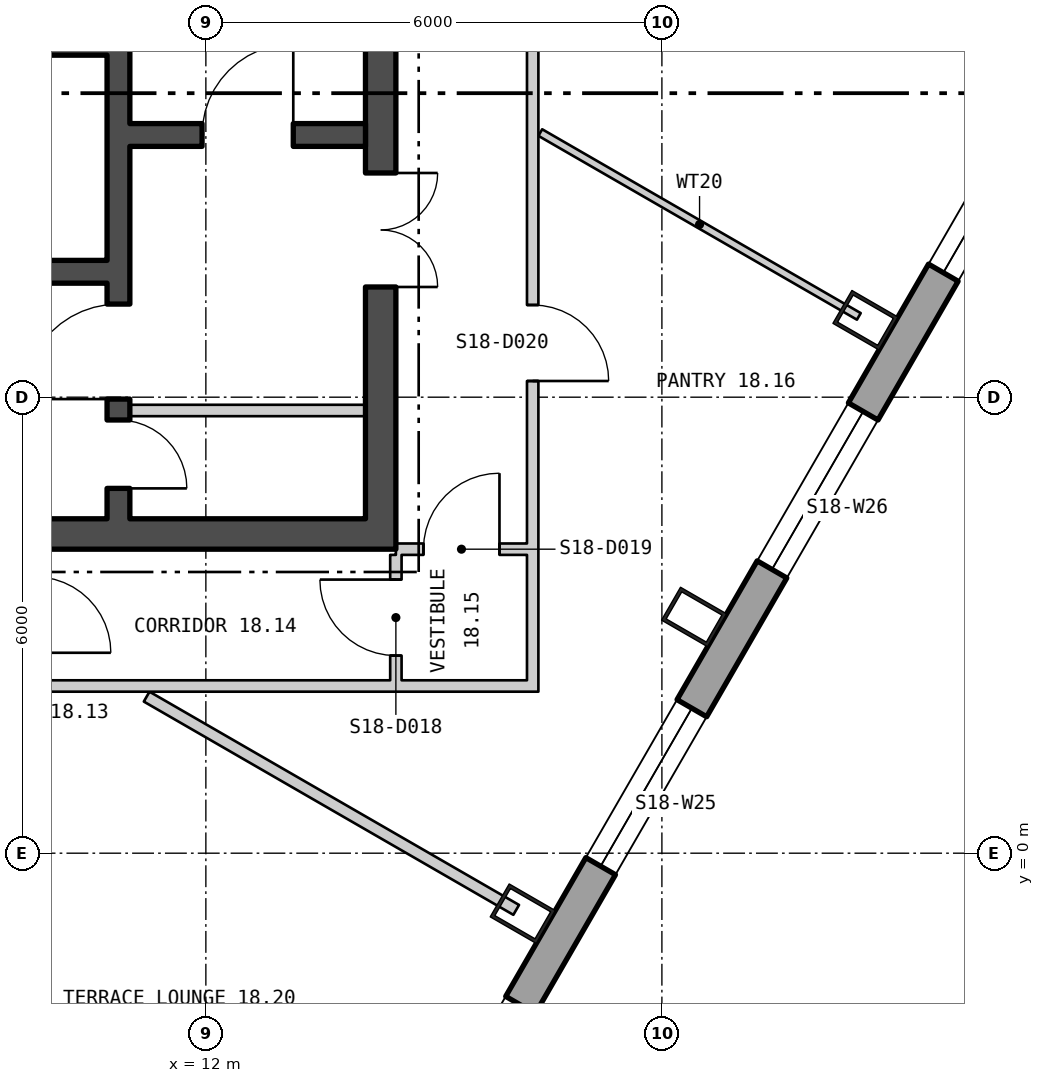
"""IFC4 building model, lengths in metres.
Left out: names, types, materials, properties, quantities, classifications, styles, units other than length and angle.
Written with IfcOpenShell. Run it as: python <this file> out.ifc"""

import sys

from ifc_helpers import new_model, si_unit, direction, frame, frame_2d, origin, origin_2d, place, context, subcontext, project, spatial, polyline, rectangle, hollow_rectangle, outline, extrude, element, fill, save


model = new_model("IFC4")
c1 = context("Model", 3, precision=1e-05, world=origin(), true_north=direction((0.0, 1.0)))
c2 = subcontext(c1, "Body", "Model", "MODEL_VIEW")
j1 = project(units=[si_unit("LENGTHUNIT", "METRE"), si_unit("PLANEANGLEUNIT", "RADIAN")], contexts=[c1])
p1 = place(None, origin())
s1 = spatial("IfcSite", under=j1, at=p1, CompositionType="ELEMENT")
p2 = place(p1, origin())
s2 = spatial("IfcBuilding", under=s1, at=p2, CompositionType="ELEMENT")
p3 = place(p2, frame((0.0, 0.0, 245.4)))
s3 = spatial("IfcBuildingStorey", under=s2, at=p3, CompositionType="ELEMENT", Elevation=245.4)
for number, where, z_axis, x_axis in (
    (1, (16.169, -0.796, 0.0), (0.0, 0.0, 1.0), (0.5, 0.866, 0.0)),
    (2, (18.423, 3.108, 0.0), (0.0, 0.0, 1.0), (0.5, 0.866, 0.0)),
    (3, (20.678, 7.013, 0.0), (0.0, 0.0, 1.0), (0.5, 0.866, 0.0)),
):
    element("IfcColumn", number, at=place(p3, frame(where, z_axis=z_axis, x_axis=x_axis)), inside=s3, PredefinedType="COLUMN", context=c2, shape_type="SweptSolid", body=[
        extrude(hollow_rectangle(XDim=0.5, YDim=0.7, WallThickness=0.045, at=origin_2d()), origin(), (0.0, 0.0, 1.0), 3.9),
    ])
p4 = place(p3, frame((2.975, -24.799, -0.18), z_axis=(0.0, 0.0, 1.0), x_axis=(0.500000335318, 0.866025210188, 0.0)))
e4 = element("IfcWall", 4, at=p4, inside=s3, PredefinedType="SOLIDWALL", context=c2, shape_type="SweptSolid", body=[
    extrude(outline(polyline([(-0.13, -0.225), (45.88, -0.225), (45.62, 0.225), (0.13, 0.225), (-0.13, -0.225)])), origin(), (0.0, 0.0, 1.0), 3.68),
])
p5 = place(p4, frame((1.425, 0.0, 1.08)))
e5 = element("IfcOpeningElement", 5, at=p5, cuts=e4, PredefinedType="OPENING", context=c2, shape_type="SweptSolid", body=[
    extrude(rectangle(XDim=2.4, YDim=2.0, at=frame_2d((1.2, 1.0))), frame((0.0, 0.235, 0.0), z_axis=(0.0, -1.0, 0.0), x_axis=(1.0, 0.0, 0.0)), (0.0, 0.0, 1.0), 0.47),
])
p6 = place(p4, frame((5.895, 0.0, 1.08)))
e6 = element("IfcOpeningElement", 6, at=p6, cuts=e4, PredefinedType="OPENING", context=c2, shape_type="SweptSolid", body=[
    extrude(rectangle(XDim=2.4, YDim=2.0, at=frame_2d((1.2, 1.0))), frame((0.0, 0.235, 0.0), z_axis=(0.0, -1.0, 0.0), x_axis=(1.0, 0.0, 0.0)), (0.0, 0.0, 1.0), 0.47),
])
p7 = place(p4, frame((10.403, 0.0, 1.08)))
e7 = element("IfcOpeningElement", 7, at=p7, cuts=e4, PredefinedType="OPENING", context=c2, shape_type="SweptSolid", body=[
    extrude(rectangle(XDim=2.4, YDim=2.0, at=frame_2d((1.2, 1.0))), frame((0.0, 0.235, 0.0), z_axis=(0.0, -1.0, 0.0), x_axis=(1.0, 0.0, 0.0)), (0.0, 0.0, 1.0), 0.47),
])
p8 = place(p4, frame((14.912, 0.0, 1.08)))
e8 = element("IfcOpeningElement", 8, at=p8, cuts=e4, PredefinedType="OPENING", context=c2, shape_type="SweptSolid", body=[
    extrude(rectangle(XDim=2.4, YDim=2.0, at=frame_2d((1.2, 1.0))), frame((0.0, 0.235, 0.0), z_axis=(0.0, -1.0, 0.0), x_axis=(1.0, 0.0, 0.0)), (0.0, 0.0, 1.0), 0.47),
])
p9 = place(p4, frame((19.421, 0.0, 1.08)))
e9 = element("IfcOpeningElement", 9, at=p9, cuts=e4, PredefinedType="OPENING", context=c2, shape_type="SweptSolid", body=[
    extrude(rectangle(XDim=2.4, YDim=2.0, at=frame_2d((1.2, 1.0))), frame((0.0, 0.235, 0.0), z_axis=(0.0, -1.0, 0.0), x_axis=(1.0, 0.0, 0.0)), (0.0, 0.0, 1.0), 0.47),
])
p10 = place(p4, frame((23.929, 0.0, 1.08)))
e10 = element("IfcOpeningElement", 10, at=p10, cuts=e4, PredefinedType="OPENING", context=c2, shape_type="SweptSolid", body=[
    extrude(rectangle(XDim=2.4, YDim=2.0, at=frame_2d((1.2, 1.0))), frame((0.0, 0.235, 0.0), z_axis=(0.0, -1.0, 0.0), x_axis=(1.0, 0.0, 0.0)), (0.0, 0.0, 1.0), 0.47),
])
p11 = place(p4, frame((28.438, 0.0, 1.08)))
e11 = element("IfcOpeningElement", 11, at=p11, cuts=e4, PredefinedType="OPENING", context=c2, shape_type="SweptSolid", body=[
    extrude(rectangle(XDim=2.4, YDim=2.0, at=frame_2d((1.2, 1.0))), frame((0.0, 0.235, 0.0), z_axis=(0.0, -1.0, 0.0), x_axis=(1.0, 0.0, 0.0)), (0.0, 0.0, 1.0), 0.47),
])
p12 = place(p4, frame((32.947, 0.0, 1.08)))
e12 = element("IfcOpeningElement", 12, at=p12, cuts=e4, PredefinedType="OPENING", context=c2, shape_type="SweptSolid", body=[
    extrude(rectangle(XDim=2.4, YDim=2.0, at=frame_2d((1.2, 1.0))), frame((0.0, 0.235, 0.0), z_axis=(0.0, -1.0, 0.0), x_axis=(1.0, 0.0, 0.0)), (0.0, 0.0, 1.0), 0.47),
])
p13 = place(p4, frame((37.455, 0.0, 1.08)))
e13 = element("IfcOpeningElement", 13, at=p13, cuts=e4, PredefinedType="OPENING", context=c2, shape_type="SweptSolid", body=[
    extrude(rectangle(XDim=2.4, YDim=2.0, at=frame_2d((1.2, 1.0))), frame((0.0, 0.235, 0.0), z_axis=(0.0, -1.0, 0.0), x_axis=(1.0, 0.0, 0.0)), (0.0, 0.0, 1.0), 0.47),
])
p14 = place(p4, frame((41.925, 0.0, 1.08)))
e14 = element("IfcOpeningElement", 14, at=p14, cuts=e4, PredefinedType="OPENING", context=c2, shape_type="SweptSolid", body=[
    extrude(rectangle(XDim=2.4, YDim=2.0, at=frame_2d((1.2, 1.0))), frame((0.0, 0.235, 0.0), z_axis=(0.0, -1.0, 0.0), x_axis=(1.0, 0.0, 0.0)), (0.0, 0.0, 1.0), 0.47),
])
p15 = place(p3, frame((-14.5, 4.2, 0.0), z_axis=(0.0, 0.0, 1.0), x_axis=(1.0, 0.0, 0.0)))
e15 = element("IfcWall", 15, at=p15, inside=s3, PredefinedType="SHEAR", context=c2, shape_type="SweptSolid", body=[
    extrude(rectangle(XDim=29.0, YDim=0.4, at=frame_2d((14.5, 0.0))), origin(), (0.0, 0.0, 1.0), 3.7),
])
p16 = place(p15, frame((9.0, 0.0, 0.0)))
e16 = element("IfcOpeningElement", 16, at=p16, cuts=e15, PredefinedType="OPENING", context=c2, shape_type="SweptSolid", body=[
    extrude(rectangle(XDim=1.8, YDim=2.4, at=frame_2d((0.9, 1.2))), frame((0.0, 0.21, 0.0), z_axis=(0.0, -1.0, 0.0), x_axis=(1.0, 0.0, 0.0)), (0.0, 0.0, 1.0), 0.42),
])
p17 = place(p15, frame((19.0, 0.0, 0.0)))
e17 = element("IfcOpeningElement", 17, at=p17, cuts=e15, PredefinedType="OPENING", context=c2, shape_type="SweptSolid", body=[
    extrude(rectangle(XDim=1.8, YDim=2.4, at=frame_2d((0.9, 1.2))), frame((0.0, 0.21, 0.0), z_axis=(0.0, -1.0, 0.0), x_axis=(1.0, 0.0, 0.0)), (0.0, 0.0, 1.0), 0.42),
])
p18 = place(p3, frame((14.3, 4.4, 0.0), z_axis=(0.0, 0.0, 1.0), x_axis=(0.0, 1.0, 0.0)))
e18 = element("IfcWall", 18, at=p18, inside=s3, PredefinedType="SHEAR", context=c2, shape_type="SweptSolid", body=[
    extrude(rectangle(XDim=13.2, YDim=0.4, at=frame_2d((6.6, 0.0))), origin(), (0.0, 0.0, 1.0), 3.7),
])
p19 = place(p18, frame((3.05, 0.0, 0.0)))
e19 = element("IfcOpeningElement", 19, at=p19, cuts=e18, PredefinedType="OPENING", context=c2, shape_type="SweptSolid", body=[
    extrude(rectangle(XDim=1.5, YDim=2.1, at=frame_2d((0.75, 1.05))), frame((0.0, 0.21, 0.0), z_axis=(0.0, -1.0, 0.0), x_axis=(1.0, 0.0, 0.0)), (0.0, 0.0, 1.0), 0.42),
])
p20 = place(p3, frame((10.85, 4.4, 0.0), z_axis=(0.0, 0.0, 1.0), x_axis=(0.0, 1.0, 0.0)))
e20 = element("IfcWall", 20, at=p20, inside=s3, PredefinedType="SHEAR", context=c2, shape_type="SweptSolid", body=[
    extrude(rectangle(XDim=13.2, YDim=0.3, at=frame_2d((6.6, 0.0))), origin(), (0.0, 0.0, 1.0), 3.7),
])
p21 = place(p20, frame((1.575, 0.0, 0.0)))
e21 = element("IfcOpeningElement", 21, at=p21, cuts=e20, PredefinedType="OPENING", context=c2, shape_type="SweptSolid", body=[
    extrude(rectangle(XDim=1.25, YDim=2.1, at=frame_2d((0.625, 1.05))), frame((0.0, 0.16, 0.0), z_axis=(0.0, -1.0, 0.0), x_axis=(1.0, 0.0, 0.0)), (0.0, 0.0, 1.0), 0.32),
])
p22 = place(p20, frame((0.4, 0.0, 0.0)))
e22 = element("IfcOpeningElement", 22, at=p22, cuts=e20, PredefinedType="OPENING", context=c2, shape_type="SweptSolid", body=[
    extrude(rectangle(XDim=0.9, YDim=2.1, at=frame_2d((0.45, 1.05))), frame((0.0, 0.16, 0.0), z_axis=(0.0, -1.0, 0.0), x_axis=(1.0, 0.0, 0.0)), (0.0, 0.0, 1.0), 0.32),
])
p23 = place(p3, frame((11.0, 9.45, 0.0), z_axis=(0.0, 0.0, 1.0), x_axis=(1.0, 0.0, 0.0)))
e23 = element("IfcWall", 23, at=p23, inside=s3, PredefinedType="SHEAR", context=c2, shape_type="SweptSolid", body=[
    extrude(rectangle(XDim=3.1, YDim=0.3, at=frame_2d((1.55, 0.0))), origin(), (0.0, 0.0, 1.0), 3.7),
])
p24 = place(p23, frame((0.95, 0.0, 0.0)))
e24 = element("IfcOpeningElement", 24, at=p24, cuts=e23, PredefinedType="OPENING", context=c2, shape_type="SweptSolid", body=[
    extrude(rectangle(XDim=1.2, YDim=2.1, at=frame_2d((0.6, 1.05))), frame((0.0, 0.16, 0.0), z_axis=(0.0, -1.0, 0.0), x_axis=(1.0, 0.0, 0.0)), (0.0, 0.0, 1.0), 0.32),
])
p25 = place(p3, frame((2.6, 10.65, 0.0), z_axis=(0.0, 0.0, 1.0), x_axis=(1.0, 0.0, 0.0)))
e25 = element("IfcWall", 25, at=p25, inside=s3, PredefinedType="SHEAR", context=c2, shape_type="SweptSolid", body=[
    extrude(rectangle(XDim=8.1, YDim=0.3, at=frame_2d((4.05, 0.0))), origin(), (0.0, 0.0, 1.0), 3.7),
])
p26 = place(p25, frame((3.65, 0.0, 0.0)))
e26 = element("IfcOpeningElement", 26, at=p26, cuts=e25, PredefinedType="OPENING", context=c2, shape_type="SweptSolid", body=[
    extrude(rectangle(XDim=1.0, YDim=2.1, at=frame_2d((0.5, 1.05))), frame((0.0, 0.16, 0.0), z_axis=(0.0, -1.0, 0.0), x_axis=(1.0, 0.0, 0.0)), (0.0, 0.0, 1.0), 0.32),
])
p27 = place(p3, frame((2.6, 7.65, 0.0), z_axis=(0.0, 0.0, 1.0), x_axis=(1.0, 0.0, 0.0)))
e27 = element("IfcWall", 27, at=p27, inside=s3, PredefinedType="SHEAR", context=c2, shape_type="SweptSolid", body=[
    extrude(rectangle(XDim=8.1, YDim=0.3, at=frame_2d((4.05, 0.0))), origin(), (0.0, 0.0, 1.0), 3.7),
])
p28 = place(p3, frame((11.0, 5.825, 0.0), z_axis=(0.0, 0.0, 1.0), x_axis=(1.0, 0.0, 0.0)))
e28 = element("IfcWall", 28, at=p28, inside=s3, PredefinedType="PARTITIONING", context=c2, shape_type="SweptSolid", body=[
    extrude(rectangle(XDim=3.1, YDim=0.15, at=frame_2d((1.55, 0.0))), origin(), (0.0, 0.0, 1.0), 3.7),
])
p29 = place(p3, frame((8.025, 2.2, 0.0), z_axis=(0.0, 0.0, 1.0), x_axis=(1.0, 0.0, 0.0)))
e29 = element("IfcWall", 29, at=p29, inside=s3, PredefinedType="PARTITIONING", context=c2, shape_type="SweptSolid", body=[
    extrude(rectangle(XDim=8.2, YDim=0.15, at=frame_2d((4.1, 0.0))), origin(), (0.0, 0.0, 1.0), 3.7),
])
p30 = place(p3, frame((11.221, 2.06, 0.0), z_axis=(0.0, 0.0, 1.0), x_axis=(0.866108468144, -0.499856100702, 0.0)))
e30 = element("IfcWall", 30, at=p30, inside=s3, PredefinedType="PARTITIONING", context=c2, shape_type="SweptSolid", body=[
    extrude(rectangle(XDim=5.614, YDim=0.15, at=frame_2d((2.807, 0.0))), origin(), (0.0, 0.0, 1.0), 3.7),
])
p31 = place(p3, frame((14.5, 2.275, 0.0), z_axis=(0.0, 0.0, 1.0), x_axis=(0.0, 1.0, 0.0)))
e31 = element("IfcWall", 31, at=p31, inside=s3, PredefinedType="PARTITIONING", context=c2, shape_type="SweptSolid", body=[
    extrude(rectangle(XDim=1.65, YDim=0.15, at=frame_2d((0.825, 0.0))), origin(), (0.0, 0.0, 1.0), 3.7),
])
p32 = place(p31, frame((0.325, 0.0, 0.0)))
e32 = element("IfcOpeningElement", 32, at=p32, cuts=e31, PredefinedType="OPENING", context=c2, shape_type="SweptSolid", body=[
    extrude(rectangle(XDim=1.0, YDim=2.1, at=frame_2d((0.5, 1.05))), frame((0.0, 0.085, 0.0), z_axis=(0.0, -1.0, 0.0), x_axis=(1.0, 0.0, 0.0)), (0.0, 0.0, 1.0), 0.17),
])
p33 = place(p3, frame((14.5, 4.0, 0.0), z_axis=(0.0, 0.0, 1.0), x_axis=(1.0, 0.0, 0.0)))
e33 = element("IfcWall", 33, at=p33, inside=s3, PredefinedType="PARTITIONING", context=c2, shape_type="SweptSolid", body=[
    extrude(rectangle(XDim=1.725, YDim=0.15, at=frame_2d((0.863, 0.0))), origin(), (0.0, 0.0, 1.0), 3.16),
])
p34 = place(p33, frame((0.363, 0.0, 0.0)))
e34 = element("IfcOpeningElement", 34, at=p34, cuts=e33, PredefinedType="OPENING", context=c2, shape_type="SweptSolid", body=[
    extrude(rectangle(XDim=1.0, YDim=2.1, at=frame_2d((0.5, 1.05))), frame((0.0, 0.085, 0.0), z_axis=(0.0, -1.0, 0.0), x_axis=(1.0, 0.0, 0.0)), (0.0, 0.0, 1.0), 0.17),
])
p35 = place(p3, frame((16.3, 2.125, 0.0), z_axis=(0.0, 0.0, 1.0), x_axis=(0.0, 1.0, 0.0)))
e35 = element("IfcWall", 35, at=p35, inside=s3, PredefinedType="PARTITIONING", context=c2, shape_type="SweptSolid", body=[
    extrude(rectangle(XDim=17.622, YDim=0.15, at=frame_2d((8.811, 0.0))), origin(), (0.0, 0.0, 1.0), 3.7),
])
p36 = place(p35, frame((4.088, 0.0, 0.0)))
e36 = element("IfcOpeningElement", 36, at=p36, cuts=e35, PredefinedType="OPENING", context=c2, shape_type="SweptSolid", body=[
    extrude(rectangle(XDim=1.0, YDim=2.1, at=frame_2d((0.5, 1.05))), frame((0.0, 0.085, 0.0), z_axis=(0.0, -1.0, 0.0), x_axis=(1.0, 0.0, 0.0)), (0.0, 0.0, 1.0), 0.17),
])
p37 = place(p35, frame((8.517, 0.0, 0.0)))
e37 = element("IfcOpeningElement", 37, at=p37, cuts=e35, PredefinedType="OPENING", context=c2, shape_type="SweptSolid", body=[
    extrude(rectangle(XDim=1.0, YDim=2.1, at=frame_2d((0.5, 1.05))), frame((0.0, 0.085, 0.0), z_axis=(0.0, -1.0, 0.0), x_axis=(1.0, 0.0, 0.0)), (0.0, 0.0, 1.0), 0.17),
])
p38 = place(p35, frame((13.496, 0.0, 0.0)))
e38 = element("IfcOpeningElement", 38, at=p38, cuts=e35, PredefinedType="OPENING", context=c2, shape_type="SweptSolid", body=[
    extrude(rectangle(XDim=1.0, YDim=2.1, at=frame_2d((0.5, 1.05))), frame((0.0, 0.085, 0.0), z_axis=(0.0, -1.0, 0.0), x_axis=(1.0, 0.0, 0.0)), (0.0, 0.0, 1.0), 0.17),
])
p39 = place(p3, frame((16.4, 9.482, 0.0), z_axis=(0.0, 0.0, 1.0), x_axis=(0.866085797004, -0.499895381282, 0.0)))
e39 = element("IfcWall", 39, at=p39, inside=s3, PredefinedType="PARTITIONING", context=c2, shape_type="SweptSolid", body=[
    extrude(rectangle(XDim=4.839, YDim=0.1, at=frame_2d((2.42, 0.0))), origin(), (0.0, 0.0, 1.0), 3.7),
])
p40 = place(p10, origin())
e40 = element("IfcWindow", 40, at=p40, inside=s3, PartitioningType="SINGLE_PANEL", PredefinedType="WINDOW", context=c2, shape_type="SweptSolid", body=[
    extrude(rectangle(XDim=2.4, YDim=2.0, at=frame_2d((1.2, 1.0))), frame((0.0, 0.105, 0.0), z_axis=(0.0, -1.0, 0.0), x_axis=(1.0, 0.0, 0.0)), (0.0, 0.0, 1.0), 0.06),
])
fill(e10, e40)
p41 = place(p11, origin())
e41 = element("IfcWindow", 41, at=p41, inside=s3, PartitioningType="SINGLE_PANEL", PredefinedType="WINDOW", context=c2, shape_type="SweptSolid", body=[
    extrude(rectangle(XDim=2.4, YDim=2.0, at=frame_2d((1.2, 1.0))), frame((0.0, 0.105, 0.0), z_axis=(0.0, -1.0, 0.0), x_axis=(1.0, 0.0, 0.0)), (0.0, 0.0, 1.0), 0.06),
])
fill(e11, e41)
p42 = place(p12, origin())
e42 = element("IfcWindow", 42, at=p42, inside=s3, PartitioningType="SINGLE_PANEL", PredefinedType="WINDOW", context=c2, shape_type="SweptSolid", body=[
    extrude(rectangle(XDim=2.4, YDim=2.0, at=frame_2d((1.2, 1.0))), frame((0.0, 0.105, 0.0), z_axis=(0.0, -1.0, 0.0), x_axis=(1.0, 0.0, 0.0)), (0.0, 0.0, 1.0), 0.06),
])
fill(e12, e42)
p43 = place(p13, origin())
e43 = element("IfcWindow", 43, at=p43, inside=s3, PartitioningType="SINGLE_PANEL", PredefinedType="WINDOW", context=c2, shape_type="SweptSolid", body=[
    extrude(rectangle(XDim=2.4, YDim=2.0, at=frame_2d((1.2, 1.0))), frame((0.0, 0.105, 0.0), z_axis=(0.0, -1.0, 0.0), x_axis=(1.0, 0.0, 0.0)), (0.0, 0.0, 1.0), 0.06),
])
fill(e13, e43)
p44 = place(p24, origin())
e44 = element("IfcDoor", 44, at=p44, inside=s3, OperationType="SINGLE_SWING_LEFT", PredefinedType="DOOR", context=c2, shape_type="SweptSolid", body=[
    extrude(rectangle(XDim=1.2, YDim=2.1, at=frame_2d((0.6, 1.05))), frame((0.0, 0.025, 0.0), z_axis=(0.0, -1.0, 0.0), x_axis=(1.0, 0.0, 0.0)), (0.0, 0.0, 1.0), 0.05),
])
fill(e24, e44)
p45 = place(p21, origin())
e45 = element("IfcDoor", 45, at=p45, inside=s3, OperationType="SINGLE_SWING_RIGHT", PredefinedType="DOOR", context=c2, shape_type="SweptSolid", body=[
    extrude(rectangle(XDim=1.25, YDim=2.1, at=frame_2d((0.625, 1.05))), frame((0.0, 0.025, 0.0), z_axis=(0.0, -1.0, 0.0), x_axis=(1.0, 0.0, 0.0)), (0.0, 0.0, 1.0), 0.05),
])
fill(e21, e45)
p46 = place(p19, origin())
e46 = element("IfcDoor", 46, at=p46, inside=s3, OperationType="DOUBLE_DOOR_SINGLE_SWING", PredefinedType="DOOR", context=c2, shape_type="SweptSolid", body=[
    extrude(rectangle(XDim=1.5, YDim=2.1, at=frame_2d((0.75, 1.05))), frame((0.0, 0.025, 0.0), z_axis=(0.0, -1.0, 0.0), x_axis=(1.0, 0.0, 0.0)), (0.0, 0.0, 1.0), 0.05),
])
fill(e19, e46)
p47 = place(p22, origin())
e47 = element("IfcDoor", 47, at=p47, inside=s3, OperationType="SINGLE_SWING_LEFT", PredefinedType="DOOR", context=c2, shape_type="SweptSolid", body=[
    extrude(rectangle(XDim=0.9, YDim=2.1, at=frame_2d((0.45, 1.05))), frame((0.0, 0.025, 0.0), z_axis=(0.0, -1.0, 0.0), x_axis=(1.0, 0.0, 0.0)), (0.0, 0.0, 1.0), 0.05),
])
fill(e22, e47)
p48 = place(p32, origin())
e48 = element("IfcDoor", 48, at=p48, inside=s3, OperationType="SINGLE_SWING_LEFT", PredefinedType="DOOR", context=c2, shape_type="SweptSolid", body=[
    extrude(rectangle(XDim=1.0, YDim=2.1, at=frame_2d((0.5, 1.05))), frame((0.0, 0.025, 0.0), z_axis=(0.0, -1.0, 0.0), x_axis=(1.0, 0.0, 0.0)), (0.0, 0.0, 1.0), 0.05),
])
fill(e32, e48)
p49 = place(p34, origin())
e49 = element("IfcDoor", 49, at=p49, inside=s3, OperationType="SINGLE_SWING_LEFT", PredefinedType="DOOR", context=c2, shape_type="SweptSolid", body=[
    extrude(rectangle(XDim=1.0, YDim=2.1, at=frame_2d((0.5, 1.05))), frame((0.0, 0.025, 0.0), z_axis=(0.0, -1.0, 0.0), x_axis=(1.0, 0.0, 0.0)), (0.0, 0.0, 1.0), 0.05),
])
fill(e34, e49)
p50 = place(p36, origin())
e50 = element("IfcDoor", 50, at=p50, inside=s3, OperationType="SINGLE_SWING_LEFT", PredefinedType="DOOR", context=c2, shape_type="SweptSolid", body=[
    extrude(rectangle(XDim=1.0, YDim=2.1, at=frame_2d((0.5, 1.05))), frame((0.0, 0.025, 0.0), z_axis=(0.0, -1.0, 0.0), x_axis=(1.0, 0.0, 0.0)), (0.0, 0.0, 1.0), 0.05),
])
fill(e36, e50)
save(model, sys.argv[1])
